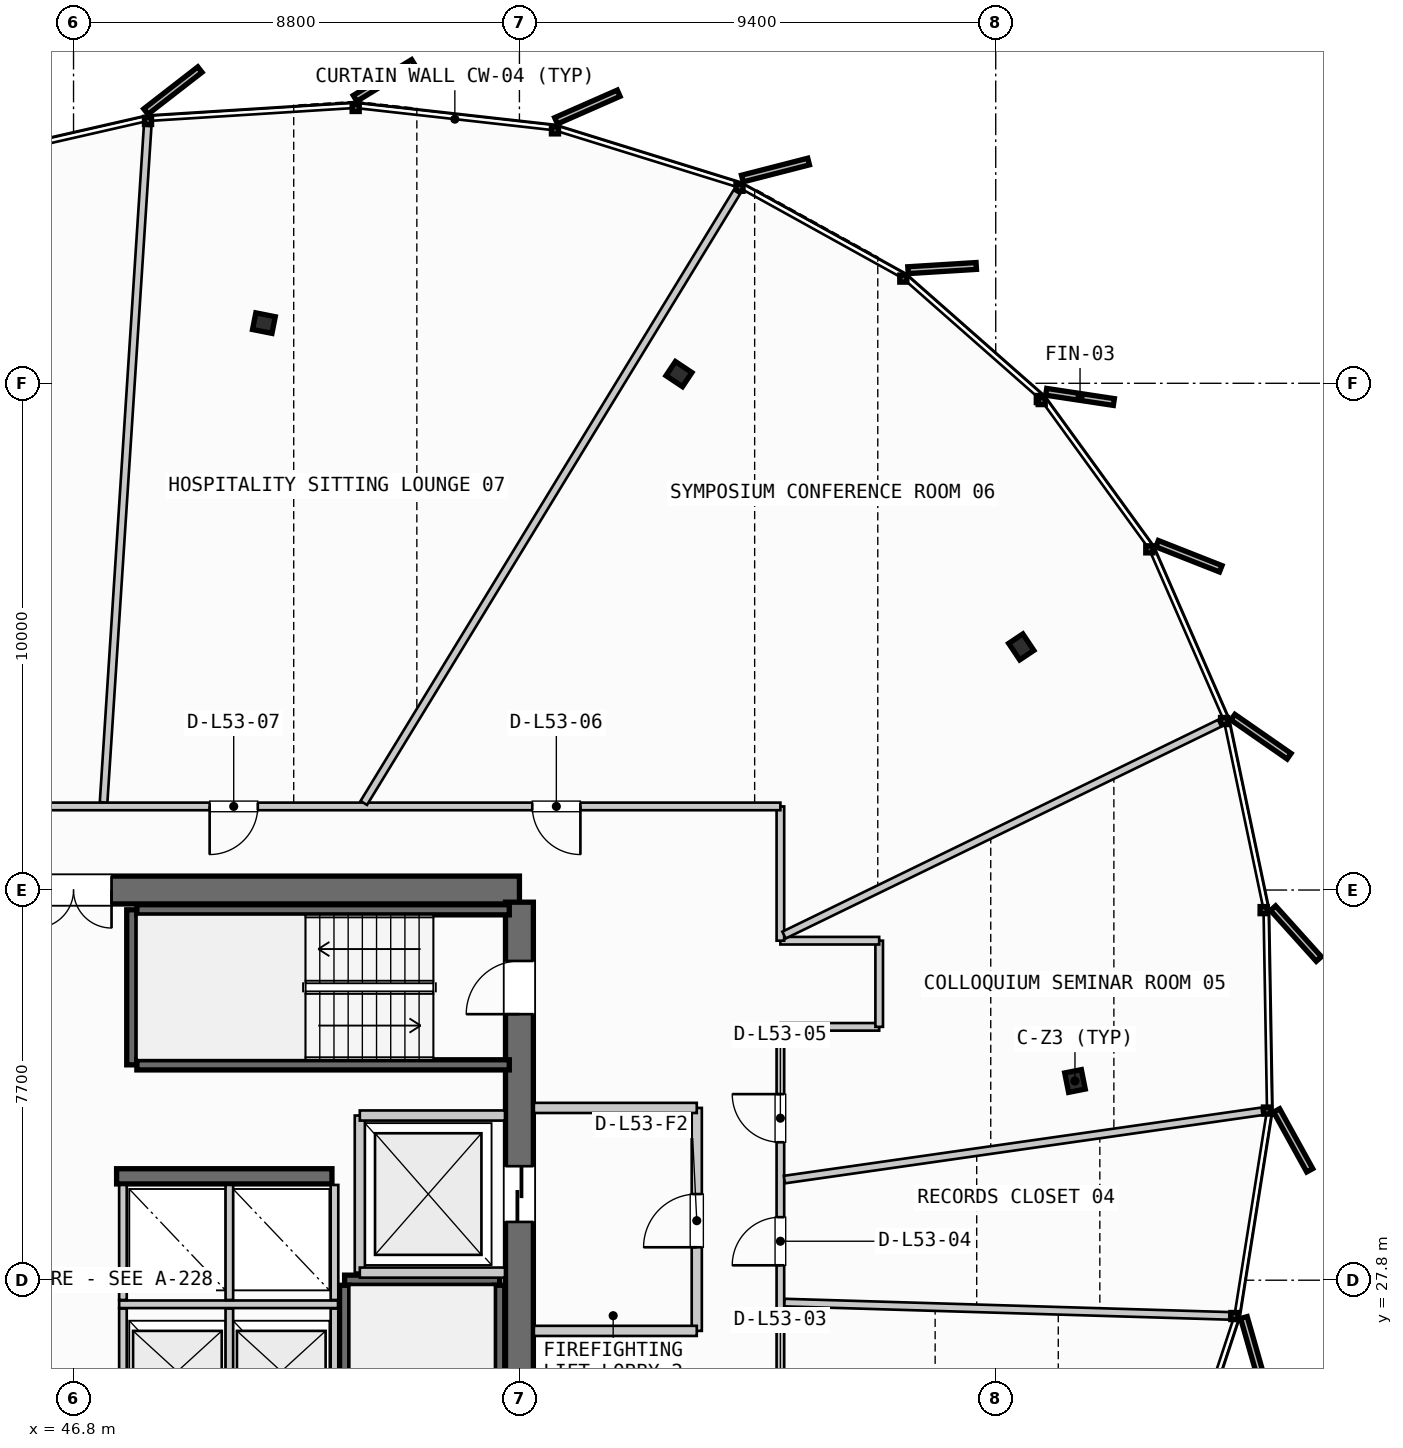
"""IFC4 building model, lengths in metres.
Left out: names, types, materials, properties, quantities, classifications, styles, units other than length and angle.
Written with IfcOpenShell. Run it as: python <this file> out.ifc"""

import sys

from ifc_helpers import new_model, si_unit, direction, frame, frame_2d, origin, origin_2d, place, context, subcontext, project, spatial, rectangle, i_section, extrude, source, transform, mapped, element, fill, save


model = new_model("IFC4")
c1 = context("Model", 3, precision=1e-05, world=origin(), true_north=direction((0.0, 1.0)))
c2 = subcontext(c1, "Body", "Model", "MODEL_VIEW")
j1 = project(units=[si_unit("LENGTHUNIT", "METRE"), si_unit("PLANEANGLEUNIT", "RADIAN")], contexts=[c1])
p1 = place(None, origin())
s1 = spatial("IfcSite", under=j1, at=p1, CompositionType="ELEMENT")
p2 = place(p1, origin())
s2 = spatial("IfcBuilding", under=s1, at=p2, CompositionType="ELEMENT")
p3 = place(p2, frame((0.0, 0.0, 204.4)))
s3 = spatial("IfcBuildingStorey", under=s2, at=p3, CompositionType="ELEMENT", Elevation=204.4)
p4 = place(p3, frame((55.6, 35.5, 0.0), z_axis=(0.0, 0.0, 1.0), x_axis=(-1.0, 0.0, 0.0)))
e1 = element("IfcWall", 1, at=p4, inside=s3, PredefinedType="SHEAR", context=c2, shape_type="SweptSolid", body=[
    extrude(rectangle(XDim=17.6, YDim=0.55, at=frame_2d((8.8, 0.0))), origin(), (0.0, 0.0, 1.0), 3.26),
])
p5 = place(p4, frame((8.05, 0.0, 0.0)))
e2 = element("IfcOpeningElement", 2, at=p5, cuts=e1, PredefinedType="OPENING", context=c2, shape_type="SweptSolid", body=[
    extrude(rectangle(XDim=1.5, YDim=2.2, at=frame_2d((0.75, 1.1))), frame((0.0, 0.285, 0.0), z_axis=(0.0, -1.0, 0.0), x_axis=(1.0, 0.0, 0.0)), (0.0, 0.0, 1.0), 0.57),
])
p6 = place(p4, frame((15.1, 0.0, 0.0)))
e3 = element("IfcOpeningElement", 3, at=p6, cuts=e1, PredefinedType="OPENING", context=c2, shape_type="SweptSolid", body=[
    extrude(rectangle(XDim=0.95, YDim=2.15, at=frame_2d((0.475, 1.075))), frame((0.0, 0.285, 0.0), z_axis=(0.0, -1.0, 0.0), x_axis=(1.0, 0.0, 0.0)), (0.0, 0.0, 1.0), 0.57),
])
p7 = place(p4, frame((12.6, 0.0, 0.0)))
e4 = element("IfcOpeningElement", 4, at=p7, cuts=e1, PredefinedType="OPENING", context=c2, shape_type="SweptSolid", body=[
    extrude(rectangle(XDim=0.95, YDim=2.15, at=frame_2d((0.475, 1.075))), frame((0.0, 0.285, 0.0), z_axis=(0.0, -1.0, 0.0), x_axis=(1.0, 0.0, 0.0)), (0.0, 0.0, 1.0), 0.57),
])
p8 = place(p4, frame((10.45, 0.0, 0.0)))
e5 = element("IfcOpeningElement", 5, at=p8, cuts=e1, PredefinedType="OPENING", context=c2, shape_type="SweptSolid", body=[
    extrude(rectangle(XDim=0.95, YDim=2.15, at=frame_2d((0.475, 1.075))), frame((0.0, 0.285, 0.0), z_axis=(0.0, -1.0, 0.0), x_axis=(1.0, 0.0, 0.0)), (0.0, 0.0, 1.0), 0.57),
])
p9 = place(p3, frame((55.6, 20.34, 0.0), z_axis=(0.0, 0.0, 1.0), x_axis=(0.0, 1.0, 0.0)))
e6 = element("IfcWall", 6, at=p9, inside=s3, PredefinedType="SHEAR", context=c2, shape_type="SweptSolid", body=[
    extrude(rectangle(XDim=14.92, YDim=0.55, at=frame_2d((7.46, 0.0))), origin(), (0.0, 0.0, 1.0), 3.26),
])
p10 = place(p9, frame((12.71, 0.0, 0.0)))
e7 = element("IfcOpeningElement", 7, at=p10, cuts=e6, PredefinedType="OPENING", context=c2, shape_type="SweptSolid", body=[
    extrude(rectangle(XDim=1.05, YDim=2.15, at=frame_2d((0.525, 1.075))), frame((0.0, 0.285, 0.0), z_axis=(0.0, -1.0, 0.0), x_axis=(1.0, 0.0, 0.0)), (0.0, 0.0, 1.0), 0.57),
])
p11 = place(p9, frame((8.61, 0.0, 0.0)))
e8 = element("IfcOpeningElement", 8, at=p11, cuts=e6, PredefinedType="OPENING", context=c2, shape_type="SweptSolid", body=[
    extrude(rectangle(XDim=1.1, YDim=2.2, at=frame_2d((0.55, 1.1))), frame((0.0, 0.285, 0.0), z_axis=(0.0, -1.0, 0.0), x_axis=(1.0, 0.0, 0.0)), (0.0, 0.0, 1.0), 0.57),
])
p12 = place(p3, frame((47.65, 29.85, 0.0), z_axis=(0.0, 0.0, 1.0), x_axis=(1.0, 0.0, 0.0)))
e9 = element("IfcWall", 9, at=p12, inside=s3, PredefinedType="SHEAR", context=c2, shape_type="SweptSolid", body=[
    extrude(rectangle(XDim=4.25, YDim=0.3, at=frame_2d((2.125, 0.0))), origin(), (0.0, 0.0, 1.0), 3.26),
])
m1 = source(origin(), c2, "Body", "SweptSolid", [
    extrude(i_section(OverallWidth=0.391, OverallDepth=0.335, WebThickness=0.023, FlangeThickness=0.034, FilletRadius=0.015, at=origin_2d()), origin(), (0.0, 0.0, 1.0), 3.26),
])
for number, where, z_axis, x_axis in (
    (10, (66.564, 31.731, 0.0), (0.0, 0.0, 1.0), (0.981, 0.195, 0.0)),
    (11, (65.504, 40.298, 0.0), (0.0, 0.0, 1.0), (0.831, 0.556, 0.0)),
    (12, (58.748, 45.681, 0.0), (0.0, 0.0, 1.0), (0.556, 0.831, 0.0)),
    (13, (50.557, 46.688, 0.0), (0.0, 0.0, 1.0), (0.195, 0.981, 0.0)),
):
    element("IfcColumn", number, at=place(p3, frame(where, z_axis=z_axis, x_axis=x_axis)), inside=s3, PredefinedType="COLUMN", context=c2, shape_type="MappedRepresentation", body=[
        mapped(m1, transform((0.0, 0.0, 0.0), scale=1.0)),
    ])
p13 = place(p3, frame((52.15, 27.8, 0.0), z_axis=(0.0, 0.0, 1.0), x_axis=(1.0, 0.0, 0.0)))
e14 = element("IfcWall", 14, at=p13, inside=s3, PredefinedType="SHEAR", context=c2, shape_type="SweptSolid", body=[
    extrude(rectangle(XDim=3.06, YDim=0.2, at=frame_2d((1.53, 0.0))), origin(), (0.0, 0.0, 1.0), 3.26),
])
for number, where, z_axis, x_axis in (
    (15, (55.21, 27.7, 0.0), (0.0, 0.0, 1.0), (0.0, -1.0, 0.0)),
    (16, (52.15, 20.35, 0.0), (0.0, 0.0, 1.0), (0.0, 1.0, 0.0)),
):
    element("IfcWall", number, at=place(p3, frame(where, z_axis=z_axis, x_axis=x_axis)), inside=s3, PredefinedType="SHEAR", context=c2, shape_type="SweptSolid", body=[
        extrude(rectangle(XDim=7.35, YDim=0.2, at=frame_2d((3.675, 0.0))), origin(), (0.0, 0.0, 1.0), 3.26),
    ])
p14 = place(p3, frame((47.95, 32.05, 0.0), z_axis=(0.0, 0.0, 1.0), x_axis=(0.0, 1.0, 0.0)))
e17 = element("IfcWall", 17, at=p14, inside=s3, PredefinedType="SHEAR", context=c2, shape_type="SweptSolid", body=[
    extrude(rectangle(XDim=3.06, YDim=0.2, at=frame_2d((1.53, 0.0))), origin(), (0.0, 0.0, 1.0), 3.26),
])
for number, where, z_axis, x_axis in (
    (18, (48.05, 35.11, 0.0), (0.0, 0.0, 1.0), (1.0, 0.0, 0.0)),
    (19, (55.4, 32.05, 0.0), (0.0, 0.0, 1.0), (-1.0, 0.0, 0.0)),
):
    element("IfcWall", number, at=place(p3, frame(where, z_axis=z_axis, x_axis=x_axis)), inside=s3, PredefinedType="SHEAR", context=c2, shape_type="SweptSolid", body=[
        extrude(rectangle(XDim=7.35, YDim=0.2, at=frame_2d((3.675, 0.0))), origin(), (0.0, 0.0, 1.0), 3.26),
    ])
p15 = place(p3, frame((52.45, 27.95, 0.0), z_axis=(0.0, 0.0, 1.0), x_axis=(0.0, 1.0, 0.0)))
e20 = element("IfcWall", 20, at=p15, inside=s3, PredefinedType="PARTITIONING", context=c2, shape_type="SweptSolid", body=[
    extrude(rectangle(XDim=3.1, YDim=0.2, at=frame_2d((1.55, 0.0))), origin(), (0.0, 0.0, 1.0), 2.595),
])
for number, where, z_axis, x_axis in (
    (21, (52.45, 27.95, 0.0), (0.0, 0.0, 1.0), (1.0, 0.0, 0.0)),
    (22, (52.45, 31.05, 0.0), (0.0, 0.0, 1.0), (1.0, 0.0, 0.0)),
):
    element("IfcWall", number, at=place(p3, frame(where, z_axis=z_axis, x_axis=x_axis)), inside=s3, PredefinedType="PARTITIONING", context=c2, shape_type="SweptSolid", body=[
        extrude(rectangle(XDim=2.865, YDim=0.2, at=frame_2d((1.433, 0.0))), origin(), (0.0, 0.0, 1.0), 2.595),
    ])
p16 = place(p3, frame((59.1, 26.8, 0.0), z_axis=(0.0, 0.0, 1.0), x_axis=(0.0, 1.0, 0.0)))
e23 = element("IfcWall", 23, at=p16, inside=s3, PredefinedType="PARTITIONING", context=c2, shape_type="SweptSolid", body=[
    extrude(rectangle(XDim=4.4, YDim=0.2, at=frame_2d((2.2, 0.0))), origin(), (0.0, 0.0, 1.0), 2.595),
])
p17 = place(p16, frame((1.65, 0.0, 0.0)))
e24 = element("IfcOpeningElement", 24, at=p17, cuts=e23, PredefinedType="OPENING", context=c2, shape_type="SweptSolid", body=[
    extrude(rectangle(XDim=1.05, YDim=2.15, at=frame_2d((0.525, 1.075))), frame((0.0, 0.11, 0.0), z_axis=(0.0, -1.0, 0.0), x_axis=(1.0, 0.0, 0.0)), (0.0, 0.0, 1.0), 0.22),
])
for number, where, z_axis, x_axis in (
    (25, (55.885, 26.8, 0.0), (0.0, 0.0, 1.0), (1.0, 0.0, 0.0)),
    (26, (55.885, 31.2, 0.0), (0.0, 0.0, 1.0), (1.0, 0.0, 0.0)),
):
    element("IfcWall", number, at=place(p3, frame(where, z_axis=z_axis, x_axis=x_axis)), inside=s3, PredefinedType="PARTITIONING", context=c2, shape_type="SweptSolid", body=[
        extrude(rectangle(XDim=3.215, YDim=0.2, at=frame_2d((1.607, 0.0))), origin(), (0.0, 0.0, 1.0), 2.595),
    ])
p18 = place(p3, frame((47.7, 27.325, 0.0), z_axis=(0.0, 0.0, 1.0), x_axis=(1.0, 0.0, 0.0)))
e27 = element("IfcWall", 27, at=p18, inside=s3, PredefinedType="PARTITIONING", context=c2, shape_type="SweptSolid", body=[
    extrude(rectangle(XDim=4.32, YDim=0.15, at=frame_2d((2.16, 0.0))), origin(), (0.0, 0.0, 1.0), 2.595),
])
for number, where, z_axis, x_axis in (
    (28, (47.775, 24.92, 0.0), (0.0, 0.0, 1.0), (0.0, 1.0, 0.0)),
    (29, (49.875, 24.92, 0.0), (0.0, 0.0, 1.0), (0.0, 1.0, 0.0)),
    (30, (51.95, 24.92, 0.0), (0.0, 0.0, 1.0), (0.0, 1.0, 0.0)),
):
    element("IfcWall", number, at=place(p3, frame(where, z_axis=z_axis, x_axis=x_axis)), inside=s3, PredefinedType="PARTITIONING", context=c2, shape_type="SweptSolid", body=[
        extrude(rectangle(XDim=2.32, YDim=0.15, at=frame_2d((1.16, 0.0))), origin(), (0.0, 0.0, 1.0), 2.595),
    ])
for number, where, z_axis, x_axis in (
    (31, (47.775, 27.41, 0.0), (0.0, 0.0, 1.0), (0.0, 1.0, 0.0)),
    (32, (49.875, 27.41, 0.0), (0.0, 0.0, 1.0), (0.0, 1.0, 0.0)),
    (33, (51.95, 27.41, 0.0), (0.0, 0.0, 1.0), (0.0, 1.0, 0.0)),
):
    element("IfcWall", number, at=place(p3, frame(where, z_axis=z_axis, x_axis=x_axis)), inside=s3, PredefinedType="PARTITIONING", context=c2, shape_type="SweptSolid", body=[
        extrude(rectangle(XDim=2.27, YDim=0.15, at=frame_2d((1.135, 0.0))), origin(), (0.0, 0.0, 1.0), 2.595),
    ])
p19 = place(p3, frame((60.75, 22.8, 0.0), z_axis=(0.0, 0.0, 1.0), x_axis=(0.0, 1.0, 0.0)))
e34 = element("IfcWall", 34, at=p19, inside=s3, PredefinedType="PARTITIONING", context=c2, shape_type="SweptSolid", body=[
    extrude(rectangle(XDim=10.0, YDim=0.15, at=frame_2d((5.0, 0.0))), origin(), (0.0, 0.0, 1.0), 2.595),
])
p20 = place(p19, frame((2.095, 0.0, 0.0)))
e35 = element("IfcOpeningElement", 35, at=p20, cuts=e34, PredefinedType="OPENING", context=c2, shape_type="SweptSolid", body=[
    extrude(rectangle(XDim=0.95, YDim=2.15, at=frame_2d((0.475, 1.075))), frame((0.0, 0.085, 0.0), z_axis=(0.0, -1.0, 0.0), x_axis=(1.0, 0.0, 0.0)), (0.0, 0.0, 1.0), 0.17),
])
p21 = place(p19, frame((5.294, 0.0, 0.0)))
e36 = element("IfcOpeningElement", 36, at=p21, cuts=e34, PredefinedType="OPENING", context=c2, shape_type="SweptSolid", body=[
    extrude(rectangle(XDim=0.95, YDim=2.15, at=frame_2d((0.475, 1.075))), frame((0.0, 0.085, 0.0), z_axis=(0.0, -1.0, 0.0), x_axis=(1.0, 0.0, 0.0)), (0.0, 0.0, 1.0), 0.17),
])
p22 = place(p19, frame((7.722, 0.0, 0.0)))
e37 = element("IfcOpeningElement", 37, at=p22, cuts=e34, PredefinedType="OPENING", context=c2, shape_type="SweptSolid", body=[
    extrude(rectangle(XDim=0.95, YDim=2.15, at=frame_2d((0.475, 1.075))), frame((0.0, 0.085, 0.0), z_axis=(0.0, -1.0, 0.0), x_axis=(1.0, 0.0, 0.0)), (0.0, 0.0, 1.0), 0.17),
])
p23 = place(p3, frame((60.75, 32.8, 0.0), z_axis=(0.0, 0.0, 1.0), x_axis=(1.0, 0.0, 0.0)))
e38 = element("IfcWall", 38, at=p23, inside=s3, PredefinedType="PARTITIONING", context=c2, shape_type="SweptSolid", body=[
    extrude(rectangle(XDim=1.95, YDim=0.15, at=frame_2d((0.975, 0.0))), origin(), (0.0, 0.0, 1.0), 2.595),
])
p24 = place(p3, frame((62.7, 32.8, 0.0), z_axis=(0.0, 0.0, 1.0), x_axis=(0.0, 1.0, 0.0)))
e39 = element("IfcWall", 39, at=p24, inside=s3, PredefinedType="PARTITIONING", context=c2, shape_type="SweptSolid", body=[
    extrude(rectangle(XDim=1.7, YDim=0.15, at=frame_2d((0.85, 0.0))), origin(), (0.0, 0.0, 1.0), 2.595),
])
p25 = place(p3, frame((62.7, 34.5, 0.0), z_axis=(0.0, 0.0, 1.0), x_axis=(-1.0, 0.0, 0.0)))
e40 = element("IfcWall", 40, at=p25, inside=s3, PredefinedType="PARTITIONING", context=c2, shape_type="SweptSolid", body=[
    extrude(rectangle(XDim=1.95, YDim=0.15, at=frame_2d((0.975, 0.0))), origin(), (0.0, 0.0, 1.0), 2.595),
])
p26 = place(p3, frame((60.75, 34.5, 0.0), z_axis=(0.0, 0.0, 1.0), x_axis=(0.0, 1.0, 0.0)))
e41 = element("IfcWall", 41, at=p26, inside=s3, PredefinedType="PARTITIONING", context=c2, shape_type="SweptSolid", body=[
    extrude(rectangle(XDim=2.65, YDim=0.15, at=frame_2d((1.325, 0.0))), origin(), (0.0, 0.0, 1.0), 2.595),
])
p27 = place(p3, frame((60.75, 37.15, 0.0), z_axis=(0.0, 0.0, 1.0), x_axis=(-1.0, 0.0, 0.0)))
e42 = element("IfcWall", 42, at=p27, inside=s3, PredefinedType="PARTITIONING", context=c2, shape_type="SweptSolid", body=[
    extrude(rectangle(XDim=28.35, YDim=0.15, at=frame_2d((14.175, 0.0))), origin(), (0.0, 0.0, 1.0), 2.595),
])
p28 = place(p27, frame((3.947, 0.0, 0.0)))
e43 = element("IfcOpeningElement", 43, at=p28, cuts=e42, PredefinedType="OPENING", context=c2, shape_type="SweptSolid", body=[
    extrude(rectangle(XDim=0.95, YDim=2.15, at=frame_2d((0.475, 1.075))), frame((0.0, 0.085, 0.0), z_axis=(0.0, -1.0, 0.0), x_axis=(1.0, 0.0, 0.0)), (0.0, 0.0, 1.0), 0.17),
])
p29 = place(p27, frame((10.314, 0.0, 0.0)))
e44 = element("IfcOpeningElement", 44, at=p29, cuts=e42, PredefinedType="OPENING", context=c2, shape_type="SweptSolid", body=[
    extrude(rectangle(XDim=0.95, YDim=2.15, at=frame_2d((0.475, 1.075))), frame((0.0, 0.085, 0.0), z_axis=(0.0, -1.0, 0.0), x_axis=(1.0, 0.0, 0.0)), (0.0, 0.0, 1.0), 0.17),
])
p30 = place(p27, frame((15.918, 0.0, 0.0)))
e45 = element("IfcOpeningElement", 45, at=p30, cuts=e42, PredefinedType="OPENING", context=c2, shape_type="SweptSolid", body=[
    extrude(rectangle(XDim=0.95, YDim=2.15, at=frame_2d((0.475, 1.075))), frame((0.0, 0.085, 0.0), z_axis=(0.0, -1.0, 0.0), x_axis=(1.0, 0.0, 0.0)), (0.0, 0.0, 1.0), 0.17),
])
p31 = place(p27, frame((23.1, 0.0, 0.0)))
e46 = element("IfcOpeningElement", 46, at=p31, cuts=e42, PredefinedType="OPENING", context=c2, shape_type="SweptSolid", body=[
    extrude(rectangle(XDim=0.95, YDim=2.15, at=frame_2d((0.475, 1.075))), frame((0.0, 0.085, 0.0), z_axis=(0.0, -1.0, 0.0), x_axis=(1.0, 0.0, 0.0)), (0.0, 0.0, 1.0), 0.17),
])
p32 = place(p3, frame((60.83, 27.359, 0.0), z_axis=(0.0, 0.0, 1.0), x_axis=(0.999552707867, -0.02990625681, 0.0)))
e47 = element("IfcWall", 47, at=p32, inside=s3, PredefinedType="PARTITIONING", context=c2, shape_type="SweptSolid", body=[
    extrude(rectangle(XDim=8.784, YDim=0.15, at=frame_2d((4.392, 0.0))), origin(), (0.0, 0.0, 1.0), 2.595),
])
p33 = place(p3, frame((60.829, 29.786, 0.0), z_axis=(0.0, 0.0, 1.0), x_axis=(0.989936669237, 0.141511098154, 0.0)))
e48 = element("IfcWall", 48, at=p33, inside=s3, PredefinedType="PARTITIONING", context=c2, shape_type="SweptSolid", body=[
    extrude(rectangle(XDim=9.521, YDim=0.15, at=frame_2d((4.761, 0.0))), origin(), (0.0, 0.0, 1.0), 2.595),
])
p34 = place(p3, frame((60.822, 34.611, 0.0), z_axis=(0.0, 0.0, 1.0), x_axis=(0.899297815146, 0.437336757743, 0.0)))
e49 = element("IfcWall", 49, at=p34, inside=s3, PredefinedType="PARTITIONING", context=c2, shape_type="SweptSolid", body=[
    extrude(rectangle(XDim=9.558, YDim=0.15, at=frame_2d((4.779, 0.0))), origin(), (0.0, 0.0, 1.0), 2.595),
])
p35 = place(p3, frame((52.528, 37.218, 0.0), z_axis=(0.0, 0.0, 1.0), x_axis=(0.521222786582, 0.853420650528, 0.0)))
e50 = element("IfcWall", 50, at=p35, inside=s3, PredefinedType="PARTITIONING", context=c2, shape_type="SweptSolid", body=[
    extrude(rectangle(XDim=14.126, YDim=0.15, at=frame_2d((7.063, 0.0))), origin(), (0.0, 0.0, 1.0), 2.595),
])
p36 = place(p3, frame((47.393, 37.23, 0.0), z_axis=(0.0, 0.0, 1.0), x_axis=(0.065049504942, 0.997882038072, 0.0)))
e51 = element("IfcWall", 51, at=p36, inside=s3, PredefinedType="PARTITIONING", context=c2, shape_type="SweptSolid", body=[
    extrude(rectangle(XDim=13.376, YDim=0.15, at=frame_2d((6.688, 0.0))), origin(), (0.0, 0.0, 1.0), 2.595),
])
m2 = source(origin(), c2, "Body", "SweptSolid", [
    extrude(rectangle(XDim=1.05, YDim=2.15, at=frame_2d((0.525, 1.075))), frame((0.0, 0.025, 0.0), z_axis=(0.0, -1.0, 0.0), x_axis=(1.0, 0.0, 0.0)), (0.0, 0.0, 1.0), 0.05),
])
p37 = place(p10, origin())
e52 = element("IfcDoor", 52, at=p37, inside=s3, OperationType="SINGLE_SWING_LEFT", PredefinedType="DOOR", context=c2, shape_type="MappedRepresentation", body=[
    mapped(m2, transform((0.0, 0.0, 0.0), scale=1.0)),
])
fill(e7, e52)
m3 = source(origin(), c2, "Body", "SweptSolid", [
    extrude(rectangle(XDim=1.5, YDim=2.2, at=frame_2d((0.75, 1.1))), frame((0.0, 0.025, 0.0), z_axis=(0.0, -1.0, 0.0), x_axis=(1.0, 0.0, 0.0)), (0.0, 0.0, 1.0), 0.05),
])
p38 = place(p5, origin())
e53 = element("IfcDoor", 53, at=p38, inside=s3, OperationType="DOUBLE_DOOR_SINGLE_SWING", PredefinedType="DOOR", context=c2, shape_type="MappedRepresentation", body=[
    mapped(m3, transform((0.0, 0.0, 0.0), scale=1.0)),
])
fill(e2, e53)
m4 = source(origin(), c2, "Body", "SweptSolid", [
    extrude(rectangle(XDim=1.1, YDim=2.2, at=frame_2d((0.55, 1.1))), frame((0.0, 0.025, 0.0), z_axis=(0.0, -1.0, 0.0), x_axis=(1.0, 0.0, 0.0)), (0.0, 0.0, 1.0), 0.05),
])
p39 = place(p11, origin())
e54 = element("IfcDoor", 54, at=p39, inside=s3, OperationType="SLIDING_TO_RIGHT", PredefinedType="DOOR", context=c2, shape_type="MappedRepresentation", body=[
    mapped(m4, transform((0.0, 0.0, 0.0), scale=1.0)),
])
fill(e8, e54)
p40 = place(p17, origin())
e55 = element("IfcDoor", 55, at=p40, inside=s3, OperationType="SINGLE_SWING_LEFT", PredefinedType="DOOR", context=c2, shape_type="MappedRepresentation", body=[
    mapped(m2, transform((0.0, 0.0, 0.0), scale=1.0)),
])
fill(e24, e55)
m5 = source(origin(), c2, "Body", "SweptSolid", [
    extrude(rectangle(XDim=0.95, YDim=2.15, at=frame_2d((0.475, 1.075))), frame((0.0, 0.025, 0.0), z_axis=(0.0, -1.0, 0.0), x_axis=(1.0, 0.0, 0.0)), (0.0, 0.0, 1.0), 0.05),
])
p41 = place(p21, origin())
e56 = element("IfcDoor", 56, at=p41, inside=s3, OperationType="SINGLE_SWING_LEFT", PredefinedType="DOOR", context=c2, shape_type="MappedRepresentation", body=[
    mapped(m5, transform((0.0, 0.0, 0.0), scale=1.0)),
])
fill(e36, e56)
p42 = place(p22, origin())
e57 = element("IfcDoor", 57, at=p42, inside=s3, OperationType="SINGLE_SWING_RIGHT", PredefinedType="DOOR", context=c2, shape_type="MappedRepresentation", body=[
    mapped(m5, transform((0.0, 0.0, 0.0), scale=1.0)),
])
fill(e37, e57)
p43 = place(p28, origin())
e58 = element("IfcDoor", 58, at=p43, inside=s3, OperationType="SINGLE_SWING_LEFT", PredefinedType="DOOR", context=c2, shape_type="MappedRepresentation", body=[
    mapped(m5, transform((0.0, 0.0, 0.0), scale=1.0)),
])
fill(e43, e58)
p44 = place(p29, origin())
e59 = element("IfcDoor", 59, at=p44, inside=s3, OperationType="SINGLE_SWING_RIGHT", PredefinedType="DOOR", context=c2, shape_type="MappedRepresentation", body=[
    mapped(m5, transform((0.0, 0.0, 0.0), scale=1.0)),
])
fill(e44, e59)
save(model, sys.argv[1])
